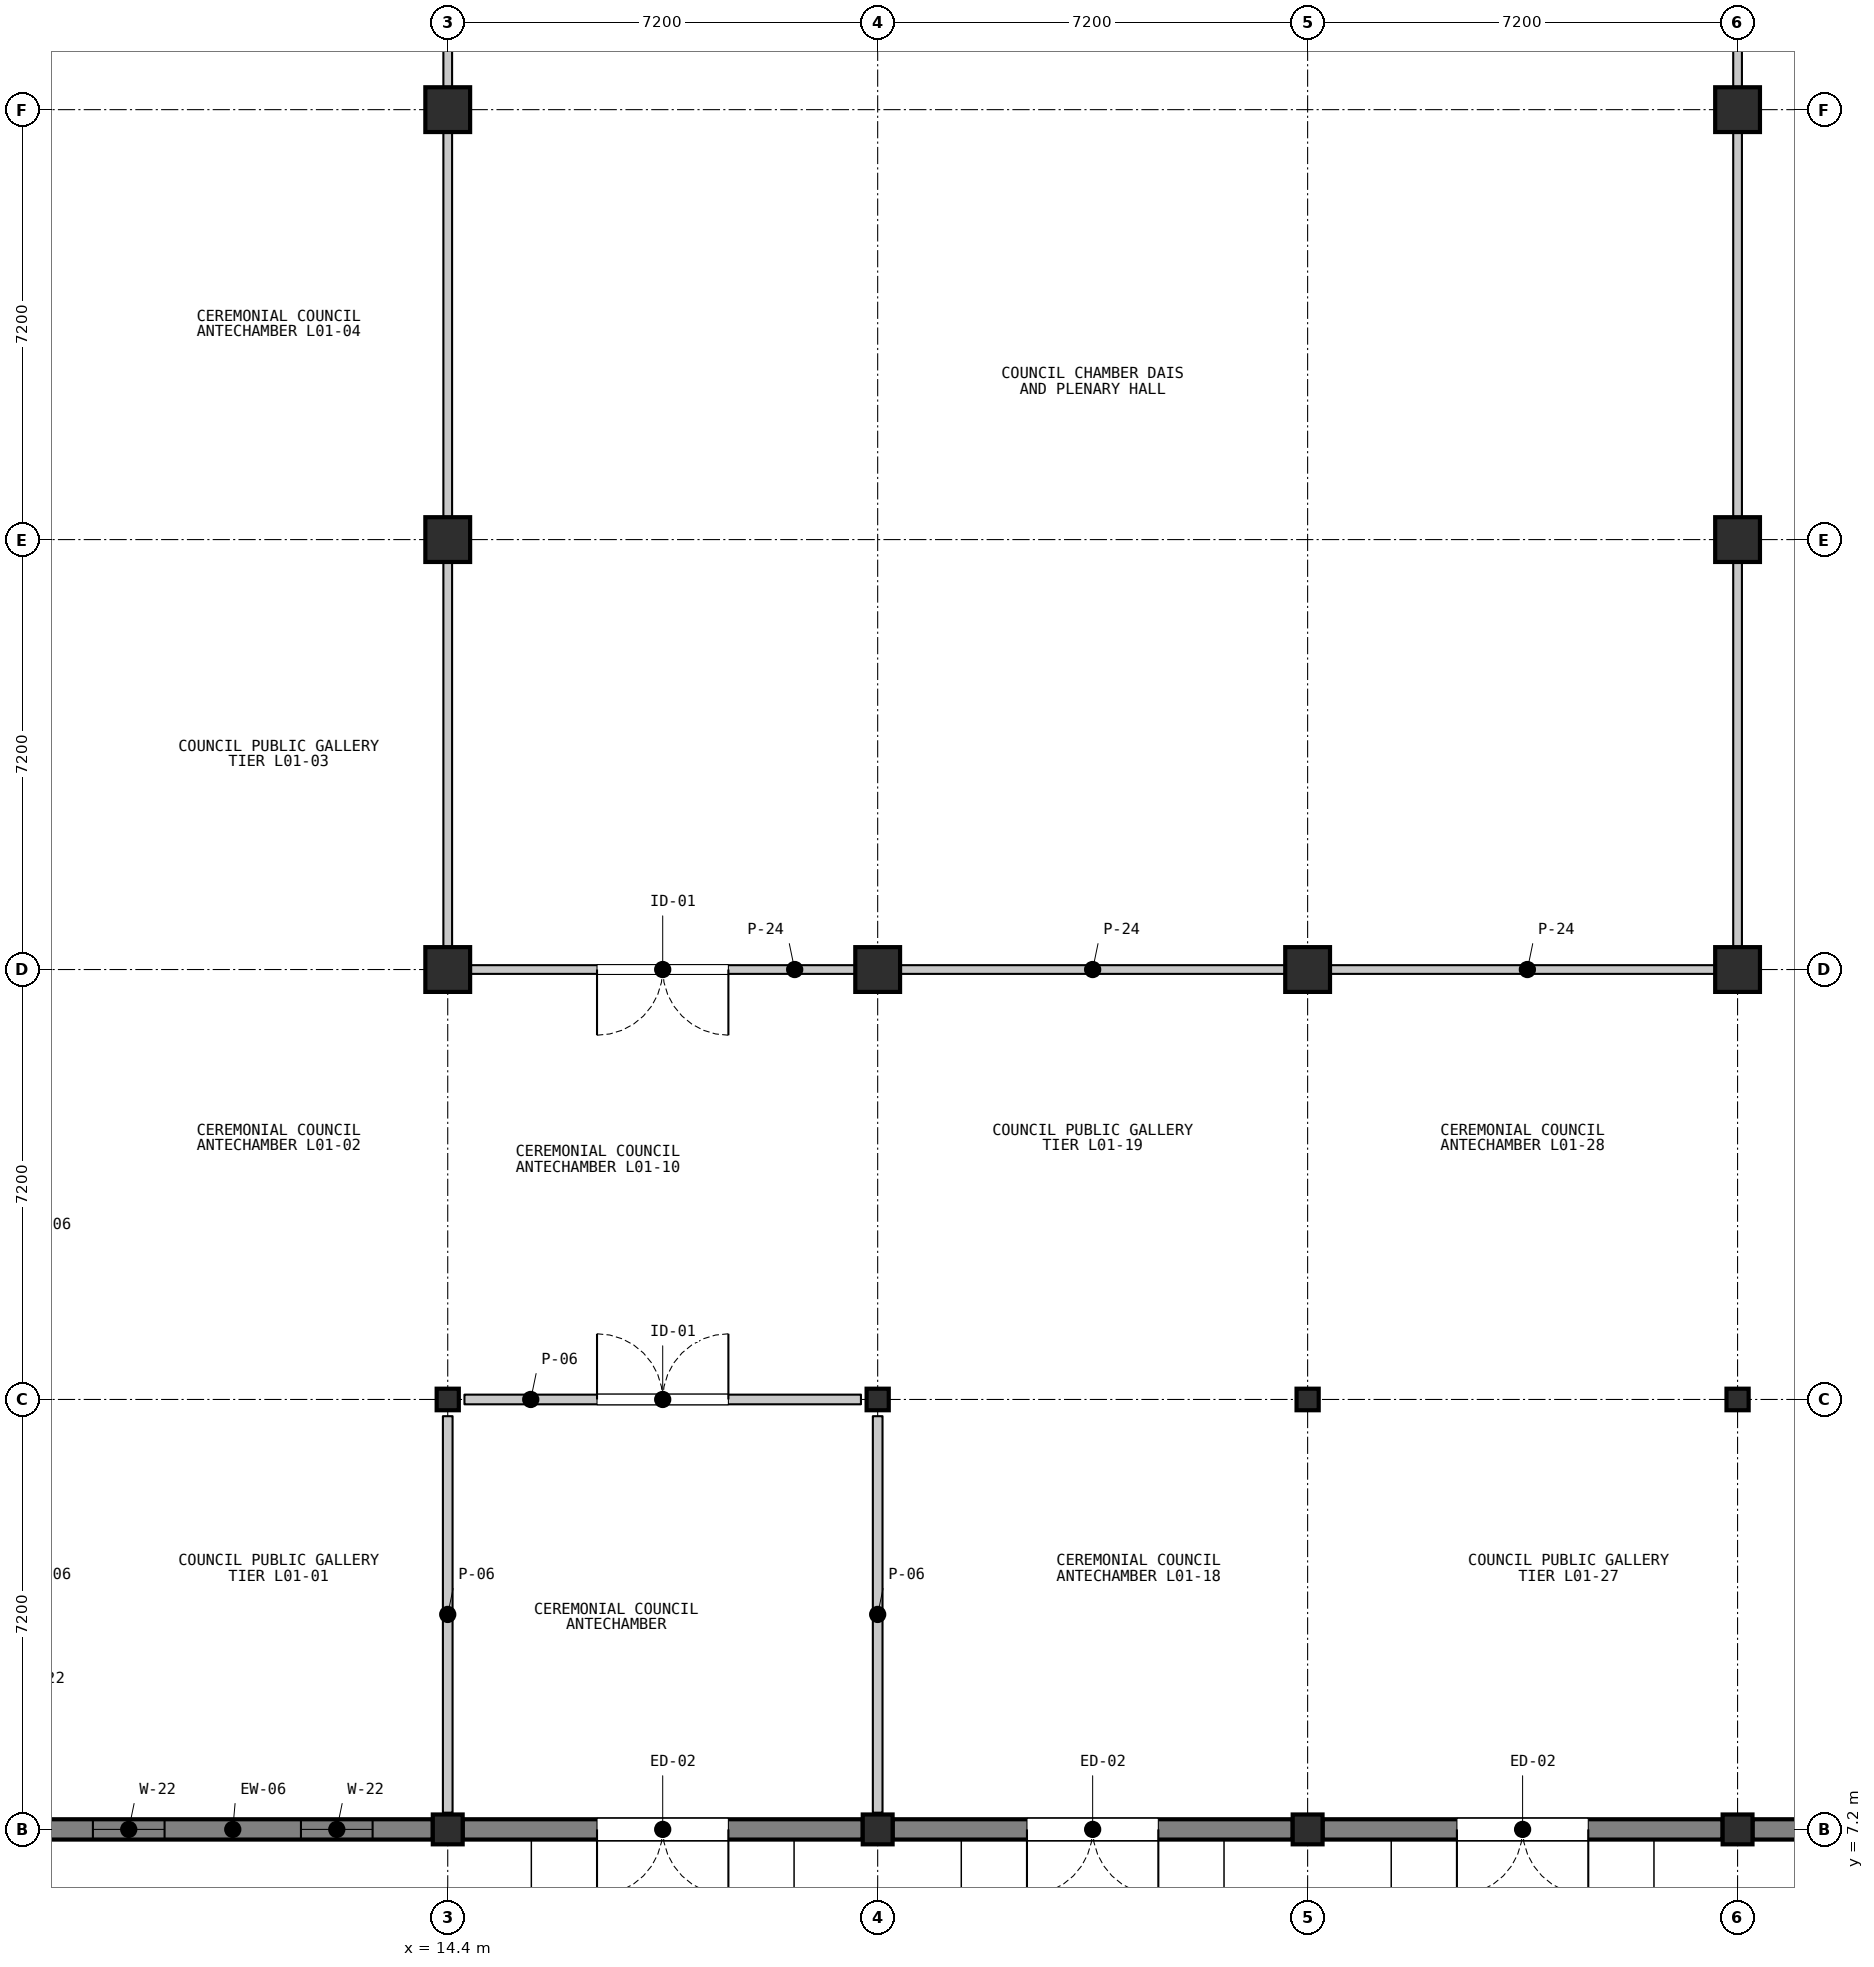
"""IFC4 building model, lengths in metres.
Left out: names, types, materials, properties, quantities, classifications, styles, units other than length and angle.
Written with IfcOpenShell. Run it as: python <this file> out.ifc"""

import sys

from ifc_helpers import new_model, si_unit, direction, frame, frame_2d, origin, origin_2d, place, context, subcontext, project, spatial, rectangle, i_section, extrude, element, fill, save


model = new_model("IFC4")
c1 = context("Model", 3, precision=1e-05, world=origin(), true_north=direction((0.0, 1.0)))
c2 = subcontext(c1, "Body", "Model", "MODEL_VIEW")
j1 = project(units=[si_unit("LENGTHUNIT", "METRE"), si_unit("PLANEANGLEUNIT", "RADIAN")], contexts=[c1])
p1 = place(None, origin())
s1 = spatial("IfcSite", under=j1, at=p1, CompositionType="ELEMENT")
p2 = place(p1, origin())
s2 = spatial("IfcBuilding", under=s1, at=p2, CompositionType="ELEMENT")
p3 = place(p2, origin())
s3 = spatial("IfcBuildingStorey", under=s2, at=p3, CompositionType="ELEMENT", Elevation=0.0)
p4 = place(p3, frame((14.4, 7.2, 0.0), z_axis=(0.0, 0.0, 1.0), x_axis=(1.0, 0.0, 0.0)))
e1 = element("IfcColumn", 1, at=p4, inside=s3, PredefinedType="COLUMN", context=c2, shape_type="SweptSolid", body=[
    extrude(rectangle(XDim=0.5, YDim=0.5, at=origin_2d()), origin(), (0.0, 0.0, 1.0), 5.4),
])
p5 = place(p3, frame((14.4, 14.4, 0.0), z_axis=(0.0, 0.0, 1.0), x_axis=(1.0, 0.0, 0.0)))
e2 = element("IfcColumn", 2, at=p5, inside=s3, PredefinedType="COLUMN", context=c2, shape_type="SweptSolid", body=[
    extrude(i_section(OverallWidth=0.371, OverallDepth=0.361, WebThickness=0.012, FlangeThickness=0.02, FilletRadius=0.015, at=origin_2d()), origin(), (0.0, 0.0, 1.0), 5.4),
])
for number, where, z_axis, x_axis in (
    (3, (14.4, 21.6, 0.0), (0.0, 0.0, 1.0), (1.0, 0.0, 0.0)),
    (4, (14.4, 28.8, 0.0), (0.0, 0.0, 1.0), (1.0, 0.0, 0.0)),
    (5, (14.4, 36.0, 0.0), (0.0, 0.0, 1.0), (1.0, 0.0, 0.0)),
):
    element("IfcColumn", number, at=place(p3, frame(where, z_axis=z_axis, x_axis=x_axis)), inside=s3, PredefinedType="COLUMN", context=c2, shape_type="SweptSolid", body=[
        extrude(rectangle(XDim=0.75, YDim=0.75, at=origin_2d()), origin(), (0.0, 0.0, 1.0), 5.4),
    ])
p6 = place(p3, frame((21.6, 7.2, 0.0), z_axis=(0.0, 0.0, 1.0), x_axis=(1.0, 0.0, 0.0)))
e6 = element("IfcColumn", 6, at=p6, inside=s3, PredefinedType="COLUMN", context=c2, shape_type="SweptSolid", body=[
    extrude(rectangle(XDim=0.5, YDim=0.5, at=origin_2d()), origin(), (0.0, 0.0, 1.0), 5.4),
])
p7 = place(p3, frame((21.6, 14.4, 0.0), z_axis=(0.0, 0.0, 1.0), x_axis=(1.0, 0.0, 0.0)))
e7 = element("IfcColumn", 7, at=p7, inside=s3, PredefinedType="COLUMN", context=c2, shape_type="SweptSolid", body=[
    extrude(i_section(OverallWidth=0.371, OverallDepth=0.361, WebThickness=0.012, FlangeThickness=0.02, FilletRadius=0.015, at=origin_2d()), origin(), (0.0, 0.0, 1.0), 5.4),
])
p8 = place(p3, frame((21.6, 21.6, 0.0), z_axis=(0.0, 0.0, 1.0), x_axis=(1.0, 0.0, 0.0)))
e8 = element("IfcColumn", 8, at=p8, inside=s3, PredefinedType="COLUMN", context=c2, shape_type="SweptSolid", body=[
    extrude(rectangle(XDim=0.75, YDim=0.75, at=origin_2d()), origin(), (0.0, 0.0, 1.0), 5.4),
])
p9 = place(p3, frame((28.8, 7.2, 0.0), z_axis=(0.0, 0.0, 1.0), x_axis=(1.0, 0.0, 0.0)))
e9 = element("IfcColumn", 9, at=p9, inside=s3, PredefinedType="COLUMN", context=c2, shape_type="SweptSolid", body=[
    extrude(rectangle(XDim=0.5, YDim=0.5, at=origin_2d()), origin(), (0.0, 0.0, 1.0), 5.4),
])
p10 = place(p3, frame((28.8, 14.4, 0.0), z_axis=(0.0, 0.0, 1.0), x_axis=(1.0, 0.0, 0.0)))
e10 = element("IfcColumn", 10, at=p10, inside=s3, PredefinedType="COLUMN", context=c2, shape_type="SweptSolid", body=[
    extrude(i_section(OverallWidth=0.371, OverallDepth=0.361, WebThickness=0.012, FlangeThickness=0.02, FilletRadius=0.015, at=origin_2d()), origin(), (0.0, 0.0, 1.0), 5.4),
])
p11 = place(p3, frame((28.8, 21.6, 0.0), z_axis=(0.0, 0.0, 1.0), x_axis=(1.0, 0.0, 0.0)))
e11 = element("IfcColumn", 11, at=p11, inside=s3, PredefinedType="COLUMN", context=c2, shape_type="SweptSolid", body=[
    extrude(rectangle(XDim=0.75, YDim=0.75, at=origin_2d()), origin(), (0.0, 0.0, 1.0), 5.4),
])
p12 = place(p3, frame((36.0, 7.2, 0.0), z_axis=(0.0, 0.0, 1.0), x_axis=(1.0, 0.0, 0.0)))
e12 = element("IfcColumn", 12, at=p12, inside=s3, PredefinedType="COLUMN", context=c2, shape_type="SweptSolid", body=[
    extrude(rectangle(XDim=0.5, YDim=0.5, at=origin_2d()), origin(), (0.0, 0.0, 1.0), 5.4),
])
p13 = place(p3, frame((36.0, 14.4, 0.0), z_axis=(0.0, 0.0, 1.0), x_axis=(1.0, 0.0, 0.0)))
e13 = element("IfcColumn", 13, at=p13, inside=s3, PredefinedType="COLUMN", context=c2, shape_type="SweptSolid", body=[
    extrude(i_section(OverallWidth=0.371, OverallDepth=0.361, WebThickness=0.012, FlangeThickness=0.02, FilletRadius=0.015, at=origin_2d()), origin(), (0.0, 0.0, 1.0), 5.4),
])
for number, where, z_axis, x_axis in (
    (14, (36.0, 21.6, 0.0), (0.0, 0.0, 1.0), (1.0, 0.0, 0.0)),
    (15, (36.0, 28.8, 0.0), (0.0, 0.0, 1.0), (1.0, 0.0, 0.0)),
    (16, (36.0, 36.0, 0.0), (0.0, 0.0, 1.0), (1.0, 0.0, 0.0)),
):
    element("IfcColumn", number, at=place(p3, frame(where, z_axis=z_axis, x_axis=x_axis)), inside=s3, PredefinedType="COLUMN", context=c2, shape_type="SweptSolid", body=[
        extrude(rectangle(XDim=0.75, YDim=0.75, at=origin_2d()), origin(), (0.0, 0.0, 1.0), 5.4),
    ])
p14 = place(p3, frame((14.15, 7.2, 0.0), z_axis=(0.0, 0.0, 1.0), x_axis=(-1.0, 0.0, 0.0)))
e17 = element("IfcWall", 17, at=p14, inside=s3, PredefinedType="SOLIDWALL", context=c2, shape_type="SweptSolid", body=[
    extrude(rectangle(XDim=6.7, YDim=0.34, at=frame_2d((3.35, 0.0))), origin(), (0.0, 0.0, 1.0), 4.598),
])
p15 = place(p14, frame((1.008, 0.0, 0.95)))
e18 = element("IfcOpeningElement", 18, at=p15, cuts=e17, PredefinedType="OPENING", context=c2, shape_type="SweptSolid", body=[
    extrude(rectangle(XDim=1.2, YDim=1.7, at=frame_2d((0.6, 0.85))), frame((0.0, 0.18, 0.0), z_axis=(0.0, -1.0, 0.0), x_axis=(1.0, 0.0, 0.0)), (0.0, 0.0, 1.0), 0.36),
])
p16 = place(p14, frame((4.492, 0.0, 0.95)))
e19 = element("IfcOpeningElement", 19, at=p16, cuts=e17, PredefinedType="OPENING", context=c2, shape_type="SweptSolid", body=[
    extrude(rectangle(XDim=1.2, YDim=1.7, at=frame_2d((0.6, 0.85))), frame((0.0, 0.18, 0.0), z_axis=(0.0, -1.0, 0.0), x_axis=(1.0, 0.0, 0.0)), (0.0, 0.0, 1.0), 0.36),
])
p17 = place(p3, frame((21.35, 7.2, 0.0), z_axis=(0.0, 0.0, 1.0), x_axis=(-1.0, 0.0, 0.0)))
e20 = element("IfcWall", 20, at=p17, inside=s3, PredefinedType="SOLIDWALL", context=c2, shape_type="SweptSolid", body=[
    extrude(rectangle(XDim=6.7, YDim=0.34, at=frame_2d((3.35, 0.0))), origin(), (0.0, 0.0, 1.0), 4.598),
])
p18 = place(p17, frame((2.25, 0.0, 0.0)))
e21 = element("IfcOpeningElement", 21, at=p18, cuts=e20, PredefinedType="OPENING", context=c2, shape_type="SweptSolid", body=[
    extrude(rectangle(XDim=2.2, YDim=2.7, at=frame_2d((1.1, 1.35))), frame((0.0, 0.18, 0.0), z_axis=(0.0, -1.0, 0.0), x_axis=(1.0, 0.0, 0.0)), (0.0, 0.0, 1.0), 0.36),
])
p19 = place(p3, frame((28.55, 7.2, 0.0), z_axis=(0.0, 0.0, 1.0), x_axis=(-1.0, 0.0, 0.0)))
e22 = element("IfcWall", 22, at=p19, inside=s3, PredefinedType="SOLIDWALL", context=c2, shape_type="SweptSolid", body=[
    extrude(rectangle(XDim=6.7, YDim=0.34, at=frame_2d((3.35, 0.0))), origin(), (0.0, 0.0, 1.0), 4.598),
])
p20 = place(p19, frame((2.25, 0.0, 0.0)))
e23 = element("IfcOpeningElement", 23, at=p20, cuts=e22, PredefinedType="OPENING", context=c2, shape_type="SweptSolid", body=[
    extrude(rectangle(XDim=2.2, YDim=2.7, at=frame_2d((1.1, 1.35))), frame((0.0, 0.18, 0.0), z_axis=(0.0, -1.0, 0.0), x_axis=(1.0, 0.0, 0.0)), (0.0, 0.0, 1.0), 0.36),
])
p21 = place(p3, frame((35.75, 7.2, 0.0), z_axis=(0.0, 0.0, 1.0), x_axis=(-1.0, 0.0, 0.0)))
e24 = element("IfcWall", 24, at=p21, inside=s3, PredefinedType="SOLIDWALL", context=c2, shape_type="SweptSolid", body=[
    extrude(rectangle(XDim=6.7, YDim=0.34, at=frame_2d((3.35, 0.0))), origin(), (0.0, 0.0, 1.0), 4.598),
])
p22 = place(p21, frame((2.25, 0.0, 0.0)))
e25 = element("IfcOpeningElement", 25, at=p22, cuts=e24, PredefinedType="OPENING", context=c2, shape_type="SweptSolid", body=[
    extrude(rectangle(XDim=2.2, YDim=2.7, at=frame_2d((1.1, 1.35))), frame((0.0, 0.18, 0.0), z_axis=(0.0, -1.0, 0.0), x_axis=(1.0, 0.0, 0.0)), (0.0, 0.0, 1.0), 0.36),
])
p23 = place(p3, frame((42.95, 7.2, 0.0), z_axis=(0.0, 0.0, 1.0), x_axis=(-1.0, 0.0, 0.0)))
e26 = element("IfcWall", 26, at=p23, inside=s3, PredefinedType="SOLIDWALL", context=c2, shape_type="SweptSolid", body=[
    extrude(rectangle(XDim=6.7, YDim=0.34, at=frame_2d((3.35, 0.0))), origin(), (0.0, 0.0, 1.0), 4.598),
])
p24 = place(p23, frame((2.45, 0.0, 0.0)))
e27 = element("IfcOpeningElement", 27, at=p24, cuts=e26, PredefinedType="OPENING", context=c2, shape_type="SweptSolid", body=[
    extrude(rectangle(XDim=1.8, YDim=2.4, at=frame_2d((0.9, 1.2))), frame((0.0, 0.18, 0.0), z_axis=(0.0, -1.0, 0.0), x_axis=(1.0, 0.0, 0.0)), (0.0, 0.0, 1.0), 0.36),
])
p25 = place(p3, frame((21.32, 21.6, 0.0), z_axis=(0.0, 0.0, 1.0), x_axis=(-1.0, 0.0, 0.0)))
e28 = element("IfcWall", 28, at=p25, inside=s3, PredefinedType="PARTITIONING", context=c2, shape_type="SweptSolid", body=[
    extrude(rectangle(XDim=6.64, YDim=0.146, at=frame_2d((3.32, 0.0))), origin(), (0.0, 0.0, 1.0), 4.588),
])
p26 = place(p25, frame((2.22, 0.0, 0.0)))
e29 = element("IfcOpeningElement", 29, at=p26, cuts=e28, PredefinedType="OPENING", context=c2, shape_type="SweptSolid", body=[
    extrude(rectangle(XDim=2.2, YDim=2.6, at=frame_2d((1.1, 1.3))), frame((0.0, 0.083, 0.0), z_axis=(0.0, -1.0, 0.0), x_axis=(1.0, 0.0, 0.0)), (0.0, 0.0, 1.0), 0.166),
])
p27 = place(p3, frame((28.52, 21.6, 0.0), z_axis=(0.0, 0.0, 1.0), x_axis=(-1.0, 0.0, 0.0)))
e30 = element("IfcWall", 30, at=p27, inside=s3, PredefinedType="PARTITIONING", context=c2, shape_type="SweptSolid", body=[
    extrude(rectangle(XDim=6.64, YDim=0.146, at=frame_2d((3.32, 0.0))), origin(), (0.0, 0.0, 1.0), 4.588),
])
p28 = place(p3, frame((35.88, 21.6, 0.0), z_axis=(0.0, 0.0, 1.0), x_axis=(-1.0, 0.0, 0.0)))
e31 = element("IfcWall", 31, at=p28, inside=s3, PredefinedType="PARTITIONING", context=c2, shape_type="SweptSolid", body=[
    extrude(rectangle(XDim=6.8, YDim=0.146, at=frame_2d((3.4, 0.0))), origin(), (0.0, 0.0, 1.0), 2.035),
])
p29 = place(p3, frame((14.4, 21.88, 0.0), z_axis=(0.0, 0.0, 1.0), x_axis=(0.0, 1.0, 0.0)))
e32 = element("IfcWall", 32, at=p29, inside=s3, PredefinedType="PARTITIONING", context=c2, shape_type="SweptSolid", body=[
    extrude(rectangle(XDim=6.64, YDim=0.146, at=frame_2d((3.32, 0.0))), origin(), (0.0, 0.0, 1.0), 4.657),
])
p30 = place(p3, frame((36.0, 28.68, 0.0), z_axis=(0.0, 0.0, 1.0), x_axis=(0.0, -1.0, 0.0)))
e33 = element("IfcWall", 33, at=p30, inside=s3, PredefinedType="PARTITIONING", context=c2, shape_type="SweptSolid", body=[
    extrude(rectangle(XDim=6.96, YDim=0.146, at=frame_2d((3.48, 0.0))), origin(), (0.0, 0.0, 1.0), 2.035),
])
p31 = place(p3, frame((14.4, 29.08, 0.0), z_axis=(0.0, 0.0, 1.0), x_axis=(0.0, 1.0, 0.0)))
e34 = element("IfcWall", 34, at=p31, inside=s3, PredefinedType="PARTITIONING", context=c2, shape_type="SweptSolid", body=[
    extrude(rectangle(XDim=6.8, YDim=0.146, at=frame_2d((3.4, 0.0))), origin(), (0.0, 0.0, 1.0), 4.588),
])
p32 = place(p3, frame((36.0, 35.88, 0.0), z_axis=(0.0, 0.0, 1.0), x_axis=(0.0, -1.0, 0.0)))
e35 = element("IfcWall", 35, at=p32, inside=s3, PredefinedType="PARTITIONING", context=c2, shape_type="SweptSolid", body=[
    extrude(rectangle(XDim=6.96, YDim=0.146, at=frame_2d((3.48, 0.0))), origin(), (0.0, 0.0, 1.0), 4.588),
])
p33 = place(p3, frame((14.4, 36.12, 0.0), z_axis=(0.0, 0.0, 1.0), x_axis=(0.0, 1.0, 0.0)))
e36 = element("IfcWall", 36, at=p33, inside=s3, PredefinedType="PARTITIONING", context=c2, shape_type="SweptSolid", body=[
    extrude(rectangle(XDim=6.8, YDim=0.146, at=frame_2d((3.4, 0.0))), origin(), (0.0, 0.0, 1.0), 4.588),
])
p34 = place(p3, frame((36.0, 43.08, 0.0), z_axis=(0.0, 0.0, 1.0), x_axis=(0.0, -1.0, 0.0)))
e37 = element("IfcWall", 37, at=p34, inside=s3, PredefinedType="PARTITIONING", context=c2, shape_type="SweptSolid", body=[
    extrude(rectangle(XDim=6.96, YDim=0.146, at=frame_2d((3.48, 0.0))), origin(), (0.0, 0.0, 1.0), 4.588),
])
p35 = place(p3, frame((14.68, 14.4, 0.0), z_axis=(0.0, 0.0, 1.0), x_axis=(1.0, 0.0, 0.0)))
e38 = element("IfcWall", 38, at=p35, inside=s3, PredefinedType="PARTITIONING", context=c2, shape_type="SweptSolid", body=[
    extrude(rectangle(XDim=6.64, YDim=0.162, at=frame_2d((3.32, 0.0))), origin(), (0.0, 0.0, 1.0), 4.588),
])
p36 = place(p35, frame((2.22, 0.0, 0.0)))
e39 = element("IfcOpeningElement", 39, at=p36, cuts=e38, PredefinedType="OPENING", context=c2, shape_type="SweptSolid", body=[
    extrude(rectangle(XDim=2.2, YDim=2.6, at=frame_2d((1.1, 1.3))), frame((0.0, 0.091, 0.0), z_axis=(0.0, -1.0, 0.0), x_axis=(1.0, 0.0, 0.0)), (0.0, 0.0, 1.0), 0.182),
])
for number, where, z_axis, x_axis in (
    (40, (14.4, 7.48, 0.0), (0.0, 0.0, 1.0), (0.0, 1.0, 0.0)),
    (41, (21.6, 14.12, 0.0), (0.0, 0.0, 1.0), (0.0, -1.0, 0.0)),
):
    element("IfcWall", number, at=place(p3, frame(where, z_axis=z_axis, x_axis=x_axis)), inside=s3, PredefinedType="PARTITIONING", context=c2, shape_type="SweptSolid", body=[
        extrude(rectangle(XDim=6.64, YDim=0.162, at=frame_2d((3.32, 0.0))), origin(), (0.0, 0.0, 1.0), 4.657),
    ])
p37 = place(p15, origin())
e42 = element("IfcWindow", 42, at=p37, inside=s3, PartitioningType="SINGLE_PANEL", PredefinedType="WINDOW", context=c2, shape_type="SweptSolid", body=[
    extrude(rectangle(XDim=1.2, YDim=1.7, at=frame_2d((0.6, 0.85))), frame((0.0, 0.03, 0.0), z_axis=(0.0, -1.0, 0.0), x_axis=(1.0, 0.0, 0.0)), (0.0, 0.0, 1.0), 0.06),
])
fill(e18, e42)
p38 = place(p16, origin())
e43 = element("IfcWindow", 43, at=p38, inside=s3, PartitioningType="SINGLE_PANEL", PredefinedType="WINDOW", context=c2, shape_type="SweptSolid", body=[
    extrude(rectangle(XDim=1.2, YDim=1.7, at=frame_2d((0.6, 0.85))), frame((0.0, 0.03, 0.0), z_axis=(0.0, -1.0, 0.0), x_axis=(1.0, 0.0, 0.0)), (0.0, 0.0, 1.0), 0.06),
])
fill(e19, e43)
p39 = place(p18, origin())
e44 = element("IfcDoor", 44, at=p39, inside=s3, OperationType="DOUBLE_DOOR_SINGLE_SWING", PredefinedType="DOOR", context=c2, shape_type="SweptSolid", body=[
    extrude(rectangle(XDim=2.2, YDim=2.7, at=frame_2d((1.1, 1.35))), frame((0.0, 0.025, 0.0), z_axis=(0.0, -1.0, 0.0), x_axis=(1.0, 0.0, 0.0)), (0.0, 0.0, 1.0), 0.05),
])
fill(e21, e44)
p40 = place(p20, origin())
e45 = element("IfcDoor", 45, at=p40, inside=s3, OperationType="DOUBLE_DOOR_SINGLE_SWING", PredefinedType="DOOR", context=c2, shape_type="SweptSolid", body=[
    extrude(rectangle(XDim=2.2, YDim=2.7, at=frame_2d((1.1, 1.35))), frame((0.0, 0.025, 0.0), z_axis=(0.0, -1.0, 0.0), x_axis=(1.0, 0.0, 0.0)), (0.0, 0.0, 1.0), 0.05),
])
fill(e23, e45)
p41 = place(p22, origin())
e46 = element("IfcDoor", 46, at=p41, inside=s3, OperationType="DOUBLE_DOOR_SINGLE_SWING", PredefinedType="DOOR", context=c2, shape_type="SweptSolid", body=[
    extrude(rectangle(XDim=2.2, YDim=2.7, at=frame_2d((1.1, 1.35))), frame((0.0, 0.025, 0.0), z_axis=(0.0, -1.0, 0.0), x_axis=(1.0, 0.0, 0.0)), (0.0, 0.0, 1.0), 0.05),
])
fill(e25, e46)
p42 = place(p26, origin())
e47 = element("IfcDoor", 47, at=p42, inside=s3, OperationType="DOUBLE_DOOR_SINGLE_SWING", PredefinedType="DOOR", context=c2, shape_type="SweptSolid", body=[
    extrude(rectangle(XDim=2.2, YDim=2.6, at=frame_2d((1.1, 1.3))), frame((0.0, 0.025, 0.0), z_axis=(0.0, -1.0, 0.0), x_axis=(1.0, 0.0, 0.0)), (0.0, 0.0, 1.0), 0.05),
])
fill(e29, e47)
p43 = place(p36, origin())
e48 = element("IfcDoor", 48, at=p43, inside=s3, OperationType="DOUBLE_DOOR_SINGLE_SWING", PredefinedType="DOOR", context=c2, shape_type="SweptSolid", body=[
    extrude(rectangle(XDim=2.2, YDim=2.6, at=frame_2d((1.1, 1.3))), frame((0.0, 0.025, 0.0), z_axis=(0.0, -1.0, 0.0), x_axis=(1.0, 0.0, 0.0)), (0.0, 0.0, 1.0), 0.05),
])
fill(e39, e48)
save(model, sys.argv[1])
